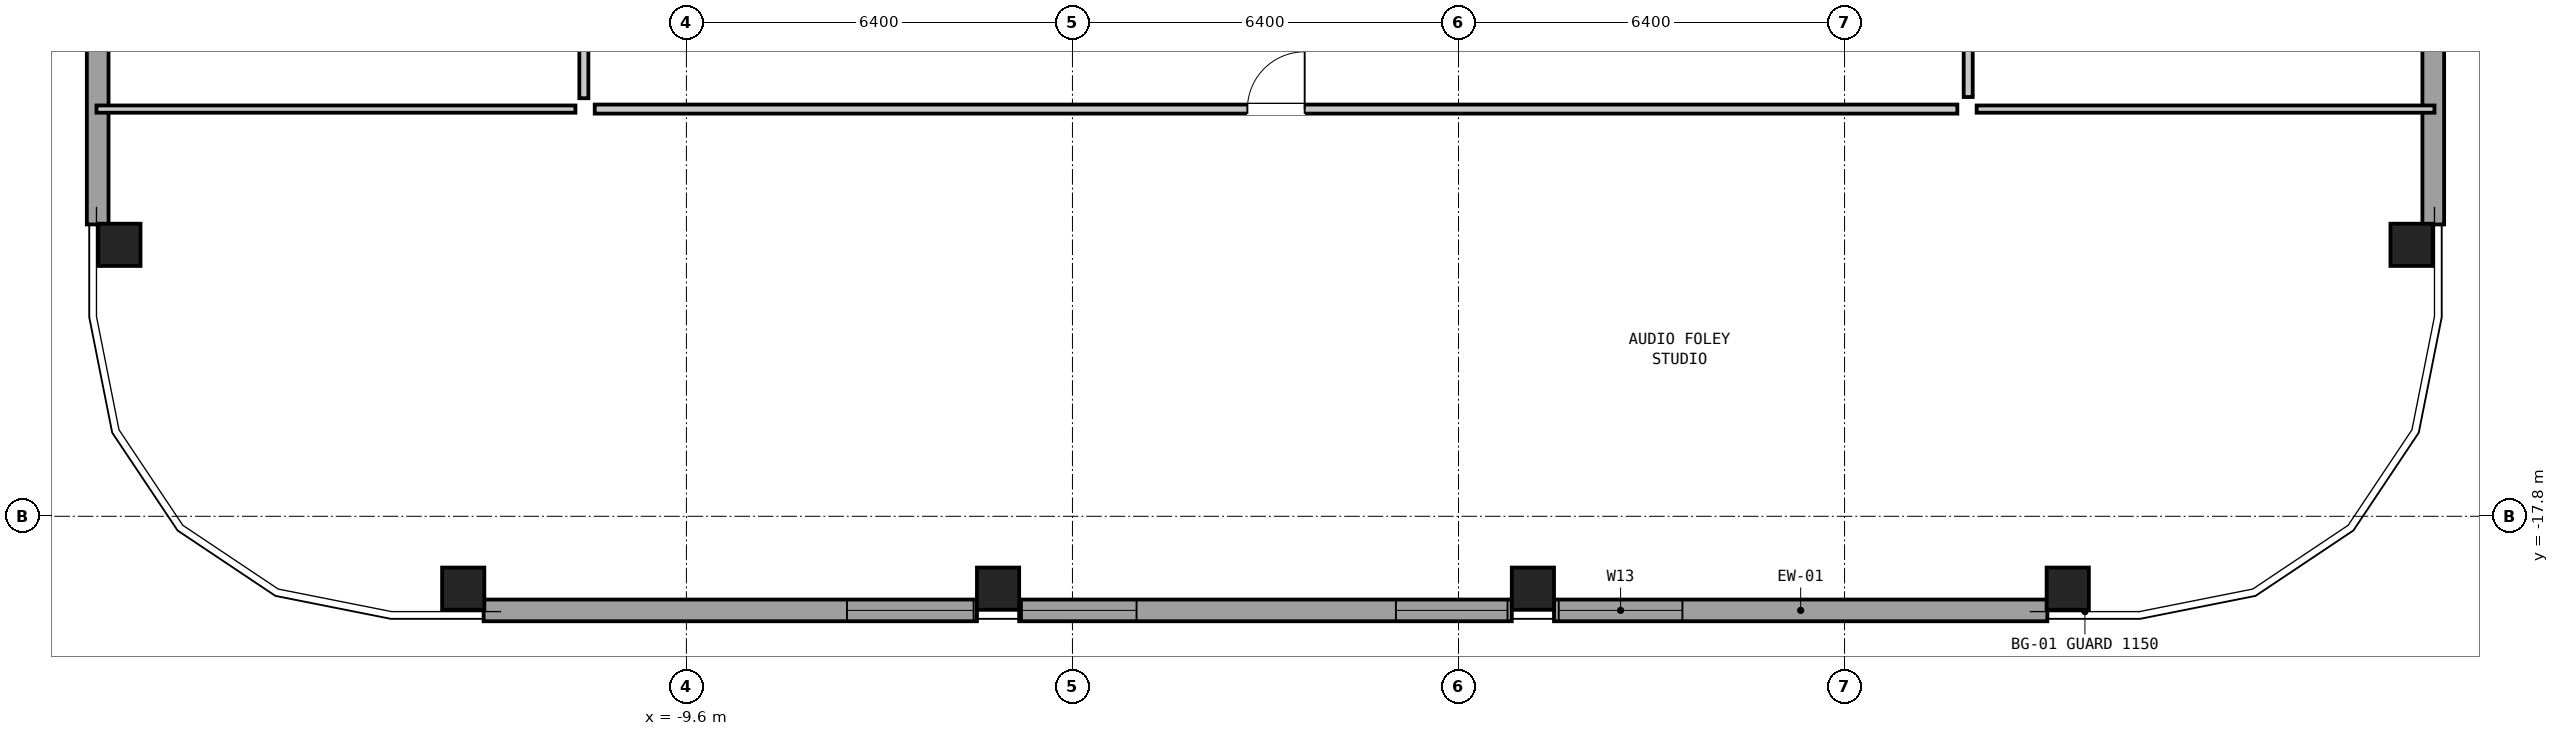
"""IFC4 building model, lengths in metres.
Left out: names, types, materials, properties, quantities, classifications, styles, units other than length and angle.
Written with IfcOpenShell. Run it as: python <this file> out.ifc"""

import sys

from ifc_helpers import new_model, si_unit, direction, frame, frame_2d, origin, origin_2d, place, context, subcontext, project, spatial, rectangle, hollow_rectangle, extrude, element, fill, save


model = new_model("IFC4")
c1 = context("Model", 3, precision=1e-05, world=origin(), true_north=direction((0.0, 1.0)))
c2 = subcontext(c1, "Body", "Model", "MODEL_VIEW")
j1 = project(units=[si_unit("LENGTHUNIT", "METRE"), si_unit("PLANEANGLEUNIT", "RADIAN")], contexts=[c1])
p1 = place(None, origin())
s1 = spatial("IfcSite", under=j1, at=p1, CompositionType="ELEMENT")
p2 = place(p1, origin())
s2 = spatial("IfcBuilding", under=s1, at=p2, CompositionType="ELEMENT")
p3 = place(p2, frame((0.0, 0.0, 199.5)))
s3 = spatial("IfcBuildingStorey", under=s2, at=p3, CompositionType="ELEMENT", Elevation=199.5)
for number, where, z_axis, x_axis in (
    (1, (-13.3, -19.0, 0.0), (0.0, 0.0, 1.0), (1.0, 0.0, 0.0)),
    (2, (-4.433, -19.0, 0.0), (0.0, 0.0, 1.0), (1.0, 0.0, 0.0)),
    (3, (4.433, -19.0, 0.0), (0.0, 0.0, 1.0), (1.0, 0.0, 0.0)),
    (4, (13.3, -19.0, 0.0), (0.0, 0.0, 1.0), (1.0, 0.0, 0.0)),
    (5, (19.0, -13.3, 0.0), (0.0, 0.0, 1.0), (0.0, 1.0, 0.0)),
    (6, (-19.0, -13.3, 0.0), (0.0, 0.0, 1.0), (0.0, 1.0, 0.0)),
):
    element("IfcColumn", number, at=place(p3, frame(where, z_axis=z_axis, x_axis=x_axis)), inside=s3, PredefinedType="COLUMN", context=c2, shape_type="SweptSolid", body=[
        extrude(hollow_rectangle(XDim=0.7, YDim=0.7, WallThickness=0.045, at=origin_2d()), origin(), (0.0, 0.0, 1.0), 3.05),
    ])
p4 = place(p3, frame((12.962, -19.36, 0.0), z_axis=(0.0, 0.0, 1.0), x_axis=(-1.0, 0.0, 0.0)))
e7 = element("IfcWall", 7, at=p4, inside=s3, PredefinedType="SOLIDWALL", context=c2, shape_type="SweptSolid", body=[
    extrude(rectangle(XDim=8.179, YDim=0.36, at=frame_2d((4.089, 0.0))), origin(), (0.0, 0.0, 1.0), 1.662),
])
p5 = place(p4, frame((6.05, 0.0, 0.2)))
e8 = element("IfcOpeningElement", 8, at=p5, cuts=e7, PredefinedType="OPENING", context=c2, shape_type="SweptSolid", body=[
    extrude(rectangle(XDim=2.05, YDim=1.0, at=frame_2d((1.025, 0.5))), frame((0.0, 0.192, 0.0), z_axis=(0.0, -1.0, 0.0), x_axis=(1.0, 0.0, 0.0)), (0.0, 0.0, 1.0), 0.384),
])
p6 = place(p3, frame((4.083, -19.36, 0.0), z_axis=(0.0, 0.0, 1.0), x_axis=(-1.0, 0.0, 0.0)))
e9 = element("IfcWall", 9, at=p6, inside=s3, PredefinedType="SOLIDWALL", context=c2, shape_type="SweptSolid", body=[
    extrude(rectangle(XDim=8.167, YDim=0.36, at=frame_2d((4.083, 0.0))), origin(), (0.0, 0.0, 1.0), 1.662),
])
p7 = place(p6, frame((0.071, 0.0, 0.2)))
e10 = element("IfcOpeningElement", 10, at=p7, cuts=e9, PredefinedType="OPENING", context=c2, shape_type="SweptSolid", body=[
    extrude(rectangle(XDim=1.85, YDim=0.9, at=frame_2d((0.925, 0.45))), frame((0.0, 0.192, 0.0), z_axis=(0.0, -1.0, 0.0), x_axis=(1.0, 0.0, 0.0)), (0.0, 0.0, 1.0), 0.384),
])
p8 = place(p6, frame((6.221, 0.0, 0.2)))
e11 = element("IfcOpeningElement", 11, at=p8, cuts=e9, PredefinedType="OPENING", context=c2, shape_type="SweptSolid", body=[
    extrude(rectangle(XDim=1.9, YDim=0.9, at=frame_2d((0.95, 0.45))), frame((0.0, 0.192, 0.0), z_axis=(0.0, -1.0, 0.0), x_axis=(1.0, 0.0, 0.0)), (0.0, 0.0, 1.0), 0.384),
])
p9 = place(p3, frame((-4.783, -19.36, 0.0), z_axis=(0.0, 0.0, 1.0), x_axis=(-1.0, 0.0, 0.0)))
e12 = element("IfcWall", 12, at=p9, inside=s3, PredefinedType="SOLIDWALL", context=c2, shape_type="SweptSolid", body=[
    extrude(rectangle(XDim=8.179, YDim=0.36, at=frame_2d((4.089, 0.0))), origin(), (0.0, 0.0, 1.0), 1.662),
])
p10 = place(p9, frame((0.055, 0.0, 0.2)))
e13 = element("IfcOpeningElement", 13, at=p10, cuts=e12, PredefinedType="OPENING", context=c2, shape_type="SweptSolid", body=[
    extrude(rectangle(XDim=2.1, YDim=1.0, at=frame_2d((1.05, 0.5))), frame((0.0, 0.192, 0.0), z_axis=(0.0, -1.0, 0.0), x_axis=(1.0, 0.0, 0.0)), (0.0, 0.0, 1.0), 0.384),
])
p11 = place(p3, frame((19.36, -4.783, 0.0), z_axis=(0.0, 0.0, 1.0), x_axis=(0.0, -1.0, 0.0)))
e14 = element("IfcWall", 14, at=p11, inside=s3, PredefinedType="SOLIDWALL", context=c2, shape_type="SweptSolid", body=[
    extrude(rectangle(XDim=8.179, YDim=0.36, at=frame_2d((4.089, 0.0))), origin(), (0.0, 0.0, 1.0), 1.662),
])
p12 = place(p11, frame((0.055, 0.0, 0.2)))
e15 = element("IfcOpeningElement", 15, at=p12, cuts=e14, PredefinedType="OPENING", context=c2, shape_type="SweptSolid", body=[
    extrude(rectangle(XDim=2.15, YDim=1.05, at=frame_2d((1.075, 0.525))), frame((0.0, 0.192, 0.0), z_axis=(0.0, -1.0, 0.0), x_axis=(1.0, 0.0, 0.0)), (0.0, 0.0, 1.0), 0.384),
])
p13 = place(p3, frame((-19.36, -12.962, 0.0), z_axis=(0.0, 0.0, 1.0), x_axis=(0.0, 1.0, 0.0)))
e16 = element("IfcWall", 16, at=p13, inside=s3, PredefinedType="SOLIDWALL", context=c2, shape_type="SweptSolid", body=[
    extrude(rectangle(XDim=8.179, YDim=0.36, at=frame_2d((4.089, 0.0))), origin(), (0.0, 0.0, 1.0), 1.662),
])
p14 = place(p13, frame((5.95, 0.0, 0.2)))
e17 = element("IfcOpeningElement", 17, at=p14, cuts=e16, PredefinedType="OPENING", context=c2, shape_type="SweptSolid", body=[
    extrude(rectangle(XDim=2.15, YDim=1.05, at=frame_2d((1.075, 0.525))), frame((0.0, 0.192, 0.0), z_axis=(0.0, -1.0, 0.0), x_axis=(1.0, 0.0, 0.0)), (0.0, 0.0, 1.0), 0.384),
])
p15 = place(p3, frame((-19.38, -11.05, 0.0), z_axis=(0.0, 0.0, 1.0), x_axis=(1.0, 0.0, 0.0)))
e18 = element("IfcWall", 18, at=p15, inside=s3, PredefinedType="PARTITIONING", context=c2, shape_type="SweptSolid", body=[
    extrude(rectangle(XDim=7.94, YDim=0.12, at=frame_2d((3.97, 0.0))), origin(), (0.0, 0.0, 1.0), 2.86),
])
p16 = place(p3, frame((11.79, -11.05, 0.0), z_axis=(0.0, 0.0, 1.0), x_axis=(1.0, 0.0, 0.0)))
e19 = element("IfcWall", 19, at=p16, inside=s3, PredefinedType="PARTITIONING", context=c2, shape_type="SweptSolid", body=[
    extrude(rectangle(XDim=7.59, YDim=0.12, at=frame_2d((3.795, 0.0))), origin(), (0.0, 0.0, 1.0), 2.86),
])
p17 = place(p3, frame((-11.12, -11.05, 0.0), z_axis=(0.0, 0.0, 1.0), x_axis=(1.0, 0.0, 0.0)))
e20 = element("IfcWall", 20, at=p17, inside=s3, PredefinedType="PARTITIONING", context=c2, shape_type="SweptSolid", body=[
    extrude(rectangle(XDim=22.59, YDim=0.15, at=frame_2d((11.295, 0.0))), origin(), (0.0, 0.0, 1.0), 2.86),
])
p18 = place(p17, frame((10.82, 0.0, 0.0)))
e21 = element("IfcOpeningElement", 21, at=p18, cuts=e20, PredefinedType="OPENING", context=c2, shape_type="SweptSolid", body=[
    extrude(rectangle(XDim=0.95, YDim=2.1, at=frame_2d((0.475, 1.05))), frame((0.0, 0.087, 0.0), z_axis=(0.0, -1.0, 0.0), x_axis=(1.0, 0.0, 0.0)), (0.0, 0.0, 1.0), 0.174),
])
p19 = place(p3, frame((-11.3, -10.87, 0.0), z_axis=(0.0, 0.0, 1.0), x_axis=(0.0, 1.0, 0.0)))
e22 = element("IfcWall", 22, at=p19, inside=s3, PredefinedType="PARTITIONING", context=c2, shape_type="SweptSolid", body=[
    extrude(rectangle(XDim=22.94, YDim=0.15, at=frame_2d((11.47, 0.0))), origin(), (0.0, 0.0, 1.0), 2.86),
])
p20 = place(p19, frame((10.995, 0.0, 0.0)))
e23 = element("IfcOpeningElement", 23, at=p20, cuts=e22, PredefinedType="OPENING", context=c2, shape_type="SweptSolid", body=[
    extrude(rectangle(XDim=0.95, YDim=2.1, at=frame_2d((0.475, 1.05))), frame((0.0, 0.087, 0.0), z_axis=(0.0, -1.0, 0.0), x_axis=(1.0, 0.0, 0.0)), (0.0, 0.0, 1.0), 0.174),
])
p21 = place(p3, frame((11.65, -10.85, 0.0), z_axis=(0.0, 0.0, 1.0), x_axis=(0.0, 1.0, 0.0)))
e24 = element("IfcWall", 24, at=p21, inside=s3, PredefinedType="PARTITIONING", context=c2, shape_type="SweptSolid", body=[
    extrude(rectangle(XDim=8.29, YDim=0.15, at=frame_2d((4.145, 0.0))), origin(), (0.0, 0.0, 1.0), 2.86),
])
p22 = place(p21, frame((3.67, 0.0, 0.0)))
e25 = element("IfcOpeningElement", 25, at=p22, cuts=e24, PredefinedType="OPENING", context=c2, shape_type="SweptSolid", body=[
    extrude(rectangle(XDim=0.95, YDim=2.1, at=frame_2d((0.475, 1.05))), frame((0.0, 0.087, 0.0), z_axis=(0.0, -1.0, 0.0), x_axis=(1.0, 0.0, 0.0)), (0.0, 0.0, 1.0), 0.174),
])
p23 = place(p5, origin())
e26 = element("IfcWindow", 26, at=p23, inside=s3, PartitioningType="SINGLE_PANEL", PredefinedType="WINDOW", context=c2, shape_type="SweptSolid", body=[
    extrude(rectangle(XDim=2.05, YDim=1.0, at=frame_2d((1.025, 0.5))), frame((0.0, 0.03, 0.0), z_axis=(0.0, -1.0, 0.0), x_axis=(1.0, 0.0, 0.0)), (0.0, 0.0, 1.0), 0.06),
])
fill(e8, e26)
p24 = place(p7, origin())
e27 = element("IfcWindow", 27, at=p24, inside=s3, PartitioningType="SINGLE_PANEL", PredefinedType="WINDOW", context=c2, shape_type="SweptSolid", body=[
    extrude(rectangle(XDim=1.85, YDim=0.9, at=frame_2d((0.925, 0.45))), frame((0.0, 0.03, 0.0), z_axis=(0.0, -1.0, 0.0), x_axis=(1.0, 0.0, 0.0)), (0.0, 0.0, 1.0), 0.06),
])
fill(e10, e27)
p25 = place(p8, origin())
e28 = element("IfcWindow", 28, at=p25, inside=s3, PartitioningType="SINGLE_PANEL", PredefinedType="WINDOW", context=c2, shape_type="SweptSolid", body=[
    extrude(rectangle(XDim=1.9, YDim=0.9, at=frame_2d((0.95, 0.45))), frame((0.0, 0.03, 0.0), z_axis=(0.0, -1.0, 0.0), x_axis=(1.0, 0.0, 0.0)), (0.0, 0.0, 1.0), 0.06),
])
fill(e11, e28)
p26 = place(p10, origin())
e29 = element("IfcWindow", 29, at=p26, inside=s3, PartitioningType="SINGLE_PANEL", PredefinedType="WINDOW", context=c2, shape_type="SweptSolid", body=[
    extrude(rectangle(XDim=2.1, YDim=1.0, at=frame_2d((1.05, 0.5))), frame((0.0, 0.03, 0.0), z_axis=(0.0, -1.0, 0.0), x_axis=(1.0, 0.0, 0.0)), (0.0, 0.0, 1.0), 0.06),
])
fill(e13, e29)
p27 = place(p18, origin())
e30 = element("IfcDoor", 30, at=p27, inside=s3, OperationType="SINGLE_SWING_RIGHT", PredefinedType="DOOR", context=c2, shape_type="SweptSolid", body=[
    extrude(rectangle(XDim=0.95, YDim=2.1, at=frame_2d((0.475, 1.05))), frame((0.0, 0.025, 0.0), z_axis=(0.0, -1.0, 0.0), x_axis=(1.0, 0.0, 0.0)), (0.0, 0.0, 1.0), 0.05),
])
fill(e21, e30)
save(model, sys.argv[1])
